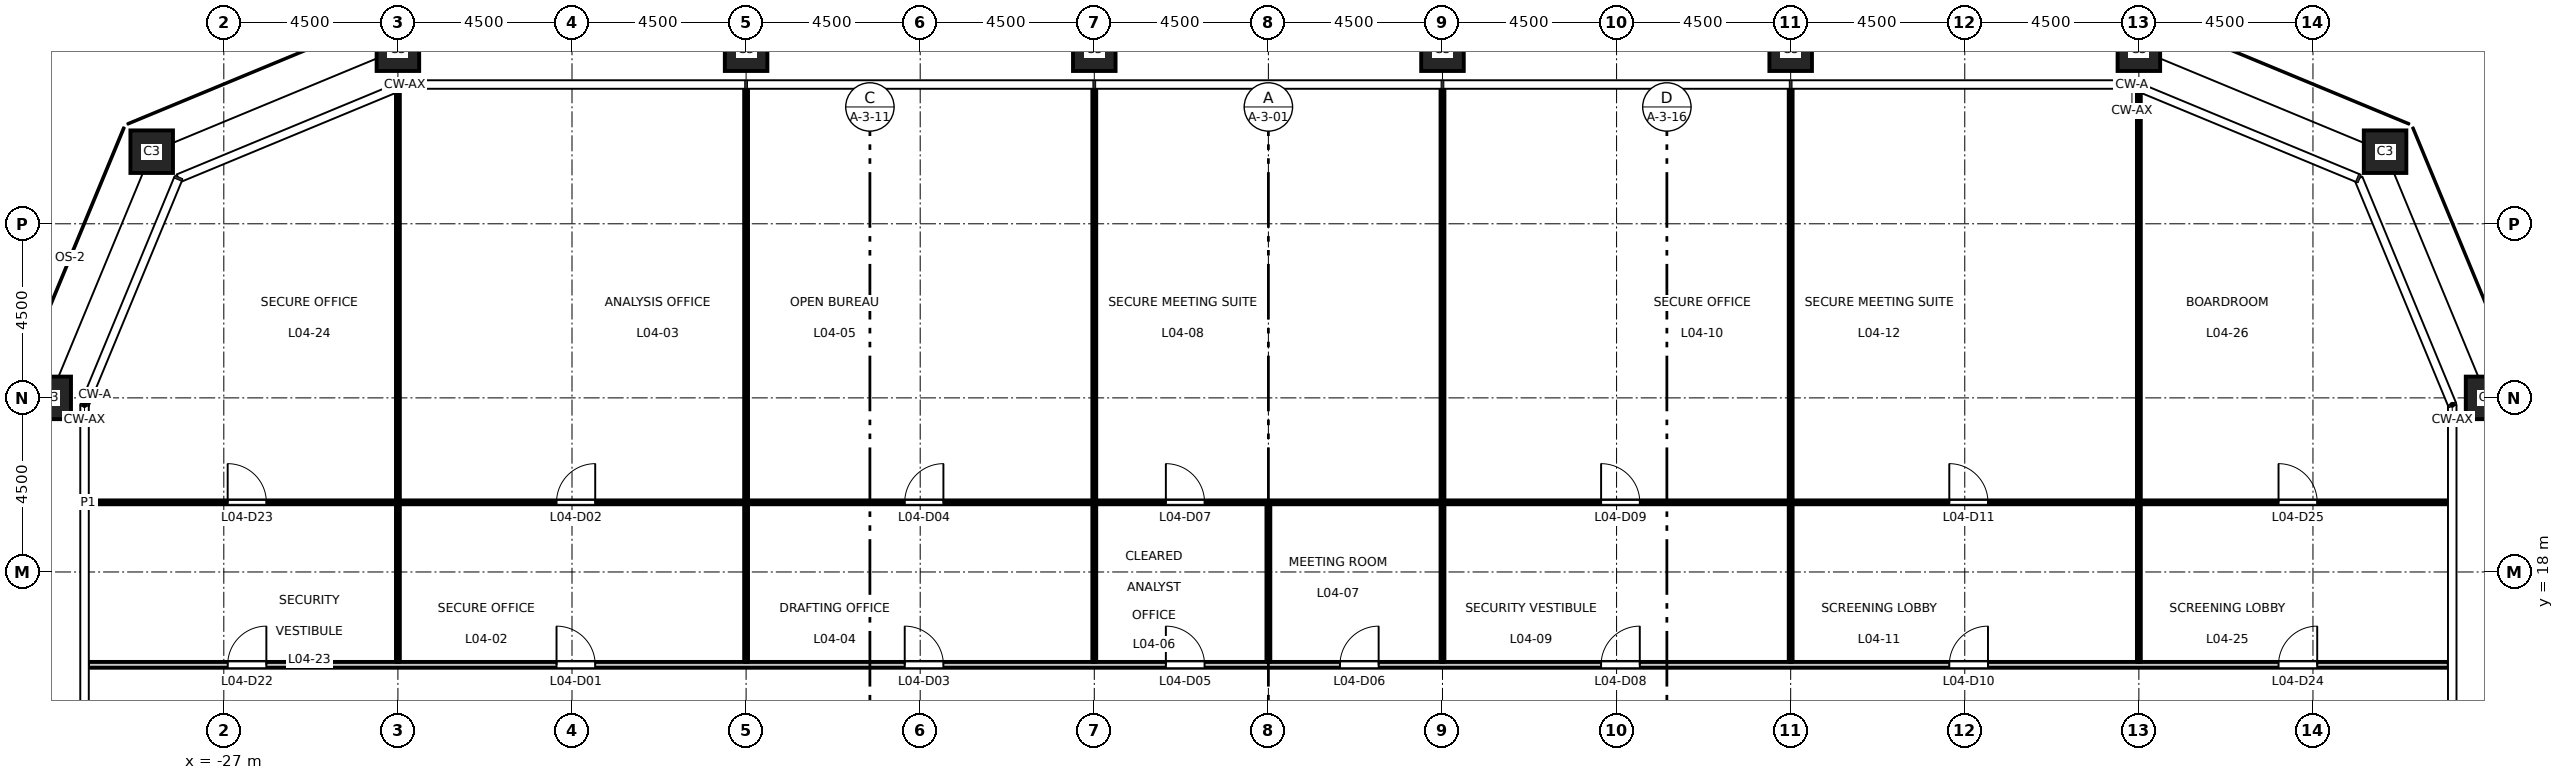
"""IFC4 building model, lengths in metres.
Left out: names, types, materials, properties, quantities, classifications, styles, units other than length and angle.
Written with IfcOpenShell. Run it as: python <this file> out.ifc"""

import sys

from ifc_helpers import new_model, si_unit, direction, frame, frame_2d, origin, origin_2d, place, context, subcontext, project, spatial, rectangle, hollow_rectangle, extrude, element, fill, save


model = new_model("IFC4")
c1 = context("Model", 3, precision=1e-05, world=origin(), true_north=direction((0.0, 1.0)))
c2 = subcontext(c1, "Body", "Model", "MODEL_VIEW")
j1 = project(units=[si_unit("LENGTHUNIT", "METRE"), si_unit("PLANEANGLEUNIT", "RADIAN")], contexts=[c1])
p1 = place(None, origin())
s1 = spatial("IfcSite", under=j1, at=p1, CompositionType="ELEMENT")
p2 = place(p1, origin())
s2 = spatial("IfcBuilding", under=s1, at=p2, CompositionType="ELEMENT")
p3 = place(p2, frame((0.0, 0.0, 22.2)))
s3 = spatial("IfcBuildingStorey", under=s2, at=p3, CompositionType="ELEMENT", Elevation=22.2)
for number, where, z_axis, x_axis in (
    (1, (31.5, 22.5, 0.0), (0.0, 0.0, 1.0), (1.0, 0.0, 0.0)),
    (2, (28.864, 28.864, 0.0), (0.0, 0.0, 1.0), (1.0, 0.0, 0.0)),
    (3, (22.5, 31.5, 0.0), (0.0, 0.0, 1.0), (1.0, 0.0, 0.0)),
    (4, (13.5, 31.5, 0.0), (0.0, 0.0, 1.0), (1.0, 0.0, 0.0)),
    (5, (4.5, 31.5, 0.0), (0.0, 0.0, 1.0), (1.0, 0.0, 0.0)),
    (6, (-4.5, 31.5, 0.0), (0.0, 0.0, 1.0), (1.0, 0.0, 0.0)),
    (7, (-13.5, 31.5, 0.0), (0.0, 0.0, 1.0), (1.0, 0.0, 0.0)),
    (8, (-22.5, 31.5, 0.0), (0.0, 0.0, 1.0), (1.0, 0.0, 0.0)),
    (9, (-28.864, 28.864, 0.0), (0.0, 0.0, 1.0), (1.0, 0.0, 0.0)),
    (10, (-31.5, 22.5, 0.0), (0.0, 0.0, 1.0), (1.0, 0.0, 0.0)),
):
    element("IfcColumn", number, at=place(p3, frame(where, z_axis=z_axis, x_axis=x_axis)), inside=s3, PredefinedType="COLUMN", context=c2, shape_type="SweptSolid", body=[
        extrude(hollow_rectangle(XDim=1.1, YDim=1.1, WallThickness=0.07, at=origin_2d()), origin(), (0.0, 0.0, 1.0), 4.5),
    ])
p4 = place(p3, frame((-30.51, 15.6, 0.0), z_axis=(0.0, 0.0, 1.0), x_axis=(1.0, 0.0, 0.0)))
e11 = element("IfcWall", 11, at=p4, inside=s3, PredefinedType="PARTITIONING", context=c2, shape_type="SweptSolid", body=[
    extrude(rectangle(XDim=61.02, YDim=0.15, at=frame_2d((30.51, 0.0))), origin(), (0.0, 0.0, 1.0), 4.35),
])
p5 = place(p4, frame((12.11, 0.0, 0.0)))
e12 = element("IfcOpeningElement", 12, at=p5, cuts=e11, PredefinedType="OPENING", context=c2, shape_type="SweptSolid", body=[
    extrude(rectangle(XDim=1.0, YDim=2.1, at=frame_2d((0.5, 1.05))), frame((0.0, 0.085, 0.0), z_axis=(0.0, -1.0, 0.0), x_axis=(1.0, 0.0, 0.0)), (0.0, 0.0, 1.0), 0.17),
])
p6 = place(p4, frame((21.11, 0.0, 0.0)))
e13 = element("IfcOpeningElement", 13, at=p6, cuts=e11, PredefinedType="OPENING", context=c2, shape_type="SweptSolid", body=[
    extrude(rectangle(XDim=1.0, YDim=2.1, at=frame_2d((0.5, 1.05))), frame((0.0, 0.085, 0.0), z_axis=(0.0, -1.0, 0.0), x_axis=(1.0, 0.0, 0.0)), (0.0, 0.0, 1.0), 0.17),
])
p7 = place(p4, frame((27.86, 0.0, 0.0)))
e14 = element("IfcOpeningElement", 14, at=p7, cuts=e11, PredefinedType="OPENING", context=c2, shape_type="SweptSolid", body=[
    extrude(rectangle(XDim=1.0, YDim=2.1, at=frame_2d((0.5, 1.05))), frame((0.0, 0.085, 0.0), z_axis=(0.0, -1.0, 0.0), x_axis=(1.0, 0.0, 0.0)), (0.0, 0.0, 1.0), 0.17),
])
p8 = place(p4, frame((32.36, 0.0, 0.0)))
e15 = element("IfcOpeningElement", 15, at=p8, cuts=e11, PredefinedType="OPENING", context=c2, shape_type="SweptSolid", body=[
    extrude(rectangle(XDim=1.0, YDim=2.1, at=frame_2d((0.5, 1.05))), frame((0.0, 0.085, 0.0), z_axis=(0.0, -1.0, 0.0), x_axis=(1.0, 0.0, 0.0)), (0.0, 0.0, 1.0), 0.17),
])
p9 = place(p4, frame((39.11, 0.0, 0.0)))
e16 = element("IfcOpeningElement", 16, at=p9, cuts=e11, PredefinedType="OPENING", context=c2, shape_type="SweptSolid", body=[
    extrude(rectangle(XDim=1.0, YDim=2.1, at=frame_2d((0.5, 1.05))), frame((0.0, 0.085, 0.0), z_axis=(0.0, -1.0, 0.0), x_axis=(1.0, 0.0, 0.0)), (0.0, 0.0, 1.0), 0.17),
])
p10 = place(p4, frame((48.11, 0.0, 0.0)))
e17 = element("IfcOpeningElement", 17, at=p10, cuts=e11, PredefinedType="OPENING", context=c2, shape_type="SweptSolid", body=[
    extrude(rectangle(XDim=1.0, YDim=2.1, at=frame_2d((0.5, 1.05))), frame((0.0, 0.085, 0.0), z_axis=(0.0, -1.0, 0.0), x_axis=(1.0, 0.0, 0.0)), (0.0, 0.0, 1.0), 0.17),
])
p11 = place(p4, frame((3.61, 0.0, 0.0)))
e18 = element("IfcOpeningElement", 18, at=p11, cuts=e11, PredefinedType="OPENING", context=c2, shape_type="SweptSolid", body=[
    extrude(rectangle(XDim=1.0, YDim=2.1, at=frame_2d((0.5, 1.05))), frame((0.0, 0.085, 0.0), z_axis=(0.0, -1.0, 0.0), x_axis=(1.0, 0.0, 0.0)), (0.0, 0.0, 1.0), 0.17),
])
p12 = place(p4, frame((56.62, 0.0, 0.0)))
e19 = element("IfcOpeningElement", 19, at=p12, cuts=e11, PredefinedType="OPENING", context=c2, shape_type="SweptSolid", body=[
    extrude(rectangle(XDim=1.0, YDim=2.1, at=frame_2d((0.5, 1.05))), frame((0.0, 0.085, 0.0), z_axis=(0.0, -1.0, 0.0), x_axis=(1.0, 0.0, 0.0)), (0.0, 0.0, 1.0), 0.17),
])
p13 = place(p3, frame((-30.51, 19.8, 0.0), z_axis=(0.0, 0.0, 1.0), x_axis=(1.0, 0.0, 0.0)))
e20 = element("IfcWall", 20, at=p13, inside=s3, PredefinedType="PARTITIONING", context=c2, shape_type="SweptSolid", body=[
    extrude(rectangle(XDim=61.02, YDim=0.1, at=frame_2d((30.51, 0.0))), origin(), (0.0, 0.0, 1.0), 4.35),
])
p14 = place(p13, frame((12.11, 0.0, 0.0)))
e21 = element("IfcOpeningElement", 21, at=p14, cuts=e20, PredefinedType="OPENING", context=c2, shape_type="SweptSolid", body=[
    extrude(rectangle(XDim=1.0, YDim=2.1, at=frame_2d((0.5, 1.05))), frame((0.0, 0.06, 0.0), z_axis=(0.0, -1.0, 0.0), x_axis=(1.0, 0.0, 0.0)), (0.0, 0.0, 1.0), 0.12),
])
p15 = place(p13, frame((21.11, 0.0, 0.0)))
e22 = element("IfcOpeningElement", 22, at=p15, cuts=e20, PredefinedType="OPENING", context=c2, shape_type="SweptSolid", body=[
    extrude(rectangle(XDim=1.0, YDim=2.1, at=frame_2d((0.5, 1.05))), frame((0.0, 0.06, 0.0), z_axis=(0.0, -1.0, 0.0), x_axis=(1.0, 0.0, 0.0)), (0.0, 0.0, 1.0), 0.12),
])
p16 = place(p13, frame((27.86, 0.0, 0.0)))
e23 = element("IfcOpeningElement", 23, at=p16, cuts=e20, PredefinedType="OPENING", context=c2, shape_type="SweptSolid", body=[
    extrude(rectangle(XDim=1.0, YDim=2.1, at=frame_2d((0.5, 1.05))), frame((0.0, 0.06, 0.0), z_axis=(0.0, -1.0, 0.0), x_axis=(1.0, 0.0, 0.0)), (0.0, 0.0, 1.0), 0.12),
])
p17 = place(p13, frame((39.11, 0.0, 0.0)))
e24 = element("IfcOpeningElement", 24, at=p17, cuts=e20, PredefinedType="OPENING", context=c2, shape_type="SweptSolid", body=[
    extrude(rectangle(XDim=1.0, YDim=2.1, at=frame_2d((0.5, 1.05))), frame((0.0, 0.06, 0.0), z_axis=(0.0, -1.0, 0.0), x_axis=(1.0, 0.0, 0.0)), (0.0, 0.0, 1.0), 0.12),
])
p18 = place(p13, frame((48.11, 0.0, 0.0)))
e25 = element("IfcOpeningElement", 25, at=p18, cuts=e20, PredefinedType="OPENING", context=c2, shape_type="SweptSolid", body=[
    extrude(rectangle(XDim=1.0, YDim=2.1, at=frame_2d((0.5, 1.05))), frame((0.0, 0.06, 0.0), z_axis=(0.0, -1.0, 0.0), x_axis=(1.0, 0.0, 0.0)), (0.0, 0.0, 1.0), 0.12),
])
p19 = place(p13, frame((3.61, 0.0, 0.0)))
e26 = element("IfcOpeningElement", 26, at=p19, cuts=e20, PredefinedType="OPENING", context=c2, shape_type="SweptSolid", body=[
    extrude(rectangle(XDim=1.0, YDim=2.1, at=frame_2d((0.5, 1.05))), frame((0.0, 0.06, 0.0), z_axis=(0.0, -1.0, 0.0), x_axis=(1.0, 0.0, 0.0)), (0.0, 0.0, 1.0), 0.12),
])
p20 = place(p13, frame((56.62, 0.0, 0.0)))
e27 = element("IfcOpeningElement", 27, at=p20, cuts=e20, PredefinedType="OPENING", context=c2, shape_type="SweptSolid", body=[
    extrude(rectangle(XDim=1.0, YDim=2.1, at=frame_2d((0.5, 1.05))), frame((0.0, 0.06, 0.0), z_axis=(0.0, -1.0, 0.0), x_axis=(1.0, 0.0, 0.0)), (0.0, 0.0, 1.0), 0.12),
])
p21 = place(p3, frame((-22.5, 15.675, 0.0), z_axis=(0.0, 0.0, 1.0), x_axis=(0.0, 1.0, 0.0)))
e28 = element("IfcWall", 28, at=p21, inside=s3, PredefinedType="PARTITIONING", context=c2, shape_type="SweptSolid", body=[
    extrude(rectangle(XDim=4.075, YDim=0.1, at=frame_2d((2.038, 0.0))), origin(), (0.0, 0.0, 1.0), 3.35),
])
p22 = place(p3, frame((-22.5, 19.85, 0.0), z_axis=(0.0, 0.0, 1.0), x_axis=(0.0, 1.0, 0.0)))
e29 = element("IfcWall", 29, at=p22, inside=s3, PredefinedType="PARTITIONING", context=c2, shape_type="SweptSolid", body=[
    extrude(rectangle(XDim=10.578, YDim=0.1, at=frame_2d((5.289, 0.0))), origin(), (0.0, 0.0, 1.0), 3.35),
])
p23 = place(p3, frame((-13.5, 15.675, 0.0), z_axis=(0.0, 0.0, 1.0), x_axis=(0.0, 1.0, 0.0)))
e30 = element("IfcWall", 30, at=p23, inside=s3, PredefinedType="PARTITIONING", context=c2, shape_type="SweptSolid", body=[
    extrude(rectangle(XDim=4.075, YDim=0.1, at=frame_2d((2.038, 0.0))), origin(), (0.0, 0.0, 1.0), 3.35),
])
p24 = place(p3, frame((-13.5, 19.85, 0.0), z_axis=(0.0, 0.0, 1.0), x_axis=(0.0, 1.0, 0.0)))
e31 = element("IfcWall", 31, at=p24, inside=s3, PredefinedType="PARTITIONING", context=c2, shape_type="SweptSolid", body=[
    extrude(rectangle(XDim=10.66, YDim=0.1, at=frame_2d((5.33, 0.0))), origin(), (0.0, 0.0, 1.0), 3.35),
])
p25 = place(p3, frame((-4.5, 15.675, 0.0), z_axis=(0.0, 0.0, 1.0), x_axis=(0.0, 1.0, 0.0)))
e32 = element("IfcWall", 32, at=p25, inside=s3, PredefinedType="PARTITIONING", context=c2, shape_type="SweptSolid", body=[
    extrude(rectangle(XDim=4.075, YDim=0.1, at=frame_2d((2.038, 0.0))), origin(), (0.0, 0.0, 1.0), 3.35),
])
p26 = place(p3, frame((-4.5, 19.85, 0.0), z_axis=(0.0, 0.0, 1.0), x_axis=(0.0, 1.0, 0.0)))
e33 = element("IfcWall", 33, at=p26, inside=s3, PredefinedType="PARTITIONING", context=c2, shape_type="SweptSolid", body=[
    extrude(rectangle(XDim=10.66, YDim=0.1, at=frame_2d((5.33, 0.0))), origin(), (0.0, 0.0, 1.0), 3.35),
])
p27 = place(p3, frame((0.0, 15.675, 0.0), z_axis=(0.0, 0.0, 1.0), x_axis=(0.0, 1.0, 0.0)))
e34 = element("IfcWall", 34, at=p27, inside=s3, PredefinedType="PARTITIONING", context=c2, shape_type="SweptSolid", body=[
    extrude(rectangle(XDim=4.075, YDim=0.1, at=frame_2d((2.038, 0.0))), origin(), (0.0, 0.0, 1.0), 4.35),
])
p28 = place(p3, frame((4.5, 15.675, 0.0), z_axis=(0.0, 0.0, 1.0), x_axis=(0.0, 1.0, 0.0)))
e35 = element("IfcWall", 35, at=p28, inside=s3, PredefinedType="PARTITIONING", context=c2, shape_type="SweptSolid", body=[
    extrude(rectangle(XDim=4.075, YDim=0.1, at=frame_2d((2.038, 0.0))), origin(), (0.0, 0.0, 1.0), 3.35),
])
p29 = place(p3, frame((4.5, 19.85, 0.0), z_axis=(0.0, 0.0, 1.0), x_axis=(0.0, 1.0, 0.0)))
e36 = element("IfcWall", 36, at=p29, inside=s3, PredefinedType="PARTITIONING", context=c2, shape_type="SweptSolid", body=[
    extrude(rectangle(XDim=10.66, YDim=0.1, at=frame_2d((5.33, 0.0))), origin(), (0.0, 0.0, 1.0), 3.35),
])
p30 = place(p3, frame((13.5, 15.675, 0.0), z_axis=(0.0, 0.0, 1.0), x_axis=(0.0, 1.0, 0.0)))
e37 = element("IfcWall", 37, at=p30, inside=s3, PredefinedType="PARTITIONING", context=c2, shape_type="SweptSolid", body=[
    extrude(rectangle(XDim=4.075, YDim=0.1, at=frame_2d((2.038, 0.0))), origin(), (0.0, 0.0, 1.0), 3.35),
])
p31 = place(p3, frame((13.5, 19.85, 0.0), z_axis=(0.0, 0.0, 1.0), x_axis=(0.0, 1.0, 0.0)))
e38 = element("IfcWall", 38, at=p31, inside=s3, PredefinedType="PARTITIONING", context=c2, shape_type="SweptSolid", body=[
    extrude(rectangle(XDim=10.66, YDim=0.1, at=frame_2d((5.33, 0.0))), origin(), (0.0, 0.0, 1.0), 3.35),
])
p32 = place(p3, frame((22.5, 15.675, 0.0), z_axis=(0.0, 0.0, 1.0), x_axis=(0.0, 1.0, 0.0)))
e39 = element("IfcWall", 39, at=p32, inside=s3, PredefinedType="PARTITIONING", context=c2, shape_type="SweptSolid", body=[
    extrude(rectangle(XDim=4.075, YDim=0.1, at=frame_2d((2.038, 0.0))), origin(), (0.0, 0.0, 1.0), 3.35),
])
p33 = place(p3, frame((22.5, 19.85, 0.0), z_axis=(0.0, 0.0, 1.0), x_axis=(0.0, 1.0, 0.0)))
e40 = element("IfcWall", 40, at=p33, inside=s3, PredefinedType="PARTITIONING", context=c2, shape_type="SweptSolid", body=[
    extrude(rectangle(XDim=10.578, YDim=0.1, at=frame_2d((5.289, 0.0))), origin(), (0.0, 0.0, 1.0), 3.35),
])
p34 = place(p5, origin())
e41 = element("IfcDoor", 41, at=p34, inside=s3, OperationType="SINGLE_SWING_LEFT", PredefinedType="DOOR", context=c2, shape_type="SweptSolid", body=[
    extrude(rectangle(XDim=1.0, YDim=2.1, at=frame_2d((0.5, 1.05))), frame((0.0, 0.025, 0.0), z_axis=(0.0, -1.0, 0.0), x_axis=(1.0, 0.0, 0.0)), (0.0, 0.0, 1.0), 0.05),
])
fill(e12, e41)
p35 = place(p14, origin())
e42 = element("IfcDoor", 42, at=p35, inside=s3, OperationType="SINGLE_SWING_RIGHT", PredefinedType="DOOR", context=c2, shape_type="SweptSolid", body=[
    extrude(rectangle(XDim=1.0, YDim=2.1, at=frame_2d((0.5, 1.05))), frame((0.0, 0.025, 0.0), z_axis=(0.0, -1.0, 0.0), x_axis=(1.0, 0.0, 0.0)), (0.0, 0.0, 1.0), 0.05),
])
fill(e21, e42)
p36 = place(p6, origin())
e43 = element("IfcDoor", 43, at=p36, inside=s3, OperationType="SINGLE_SWING_LEFT", PredefinedType="DOOR", context=c2, shape_type="SweptSolid", body=[
    extrude(rectangle(XDim=1.0, YDim=2.1, at=frame_2d((0.5, 1.05))), frame((0.0, 0.025, 0.0), z_axis=(0.0, -1.0, 0.0), x_axis=(1.0, 0.0, 0.0)), (0.0, 0.0, 1.0), 0.05),
])
fill(e13, e43)
p37 = place(p15, origin())
e44 = element("IfcDoor", 44, at=p37, inside=s3, OperationType="SINGLE_SWING_RIGHT", PredefinedType="DOOR", context=c2, shape_type="SweptSolid", body=[
    extrude(rectangle(XDim=1.0, YDim=2.1, at=frame_2d((0.5, 1.05))), frame((0.0, 0.025, 0.0), z_axis=(0.0, -1.0, 0.0), x_axis=(1.0, 0.0, 0.0)), (0.0, 0.0, 1.0), 0.05),
])
fill(e22, e44)
p38 = place(p7, origin())
e45 = element("IfcDoor", 45, at=p38, inside=s3, OperationType="SINGLE_SWING_LEFT", PredefinedType="DOOR", context=c2, shape_type="SweptSolid", body=[
    extrude(rectangle(XDim=1.0, YDim=2.1, at=frame_2d((0.5, 1.05))), frame((0.0, 0.025, 0.0), z_axis=(0.0, -1.0, 0.0), x_axis=(1.0, 0.0, 0.0)), (0.0, 0.0, 1.0), 0.05),
])
fill(e14, e45)
p39 = place(p8, origin())
e46 = element("IfcDoor", 46, at=p39, inside=s3, OperationType="SINGLE_SWING_RIGHT", PredefinedType="DOOR", context=c2, shape_type="SweptSolid", body=[
    extrude(rectangle(XDim=1.0, YDim=2.1, at=frame_2d((0.5, 1.05))), frame((0.0, 0.025, 0.0), z_axis=(0.0, -1.0, 0.0), x_axis=(1.0, 0.0, 0.0)), (0.0, 0.0, 1.0), 0.05),
])
fill(e15, e46)
p40 = place(p16, origin())
e47 = element("IfcDoor", 47, at=p40, inside=s3, OperationType="SINGLE_SWING_LEFT", PredefinedType="DOOR", context=c2, shape_type="SweptSolid", body=[
    extrude(rectangle(XDim=1.0, YDim=2.1, at=frame_2d((0.5, 1.05))), frame((0.0, 0.025, 0.0), z_axis=(0.0, -1.0, 0.0), x_axis=(1.0, 0.0, 0.0)), (0.0, 0.0, 1.0), 0.05),
])
fill(e23, e47)
p41 = place(p9, origin())
e48 = element("IfcDoor", 48, at=p41, inside=s3, OperationType="SINGLE_SWING_RIGHT", PredefinedType="DOOR", context=c2, shape_type="SweptSolid", body=[
    extrude(rectangle(XDim=1.0, YDim=2.1, at=frame_2d((0.5, 1.05))), frame((0.0, 0.025, 0.0), z_axis=(0.0, -1.0, 0.0), x_axis=(1.0, 0.0, 0.0)), (0.0, 0.0, 1.0), 0.05),
])
fill(e16, e48)
p42 = place(p17, origin())
e49 = element("IfcDoor", 49, at=p42, inside=s3, OperationType="SINGLE_SWING_LEFT", PredefinedType="DOOR", context=c2, shape_type="SweptSolid", body=[
    extrude(rectangle(XDim=1.0, YDim=2.1, at=frame_2d((0.5, 1.05))), frame((0.0, 0.025, 0.0), z_axis=(0.0, -1.0, 0.0), x_axis=(1.0, 0.0, 0.0)), (0.0, 0.0, 1.0), 0.05),
])
fill(e24, e49)
p43 = place(p10, origin())
e50 = element("IfcDoor", 50, at=p43, inside=s3, OperationType="SINGLE_SWING_RIGHT", PredefinedType="DOOR", context=c2, shape_type="SweptSolid", body=[
    extrude(rectangle(XDim=1.0, YDim=2.1, at=frame_2d((0.5, 1.05))), frame((0.0, 0.025, 0.0), z_axis=(0.0, -1.0, 0.0), x_axis=(1.0, 0.0, 0.0)), (0.0, 0.0, 1.0), 0.05),
])
fill(e17, e50)
p44 = place(p18, origin())
e51 = element("IfcDoor", 51, at=p44, inside=s3, OperationType="SINGLE_SWING_LEFT", PredefinedType="DOOR", context=c2, shape_type="SweptSolid", body=[
    extrude(rectangle(XDim=1.0, YDim=2.1, at=frame_2d((0.5, 1.05))), frame((0.0, 0.025, 0.0), z_axis=(0.0, -1.0, 0.0), x_axis=(1.0, 0.0, 0.0)), (0.0, 0.0, 1.0), 0.05),
])
fill(e25, e51)
p45 = place(p11, origin())
e52 = element("IfcDoor", 52, at=p45, inside=s3, OperationType="SINGLE_SWING_RIGHT", PredefinedType="DOOR", context=c2, shape_type="SweptSolid", body=[
    extrude(rectangle(XDim=1.0, YDim=2.1, at=frame_2d((0.5, 1.05))), frame((0.0, 0.025, 0.0), z_axis=(0.0, -1.0, 0.0), x_axis=(1.0, 0.0, 0.0)), (0.0, 0.0, 1.0), 0.05),
])
fill(e18, e52)
p46 = place(p19, origin())
e53 = element("IfcDoor", 53, at=p46, inside=s3, OperationType="SINGLE_SWING_LEFT", PredefinedType="DOOR", context=c2, shape_type="SweptSolid", body=[
    extrude(rectangle(XDim=1.0, YDim=2.1, at=frame_2d((0.5, 1.05))), frame((0.0, 0.025, 0.0), z_axis=(0.0, -1.0, 0.0), x_axis=(1.0, 0.0, 0.0)), (0.0, 0.0, 1.0), 0.05),
])
fill(e26, e53)
p47 = place(p12, origin())
e54 = element("IfcDoor", 54, at=p47, inside=s3, OperationType="SINGLE_SWING_RIGHT", PredefinedType="DOOR", context=c2, shape_type="SweptSolid", body=[
    extrude(rectangle(XDim=1.0, YDim=2.1, at=frame_2d((0.5, 1.05))), frame((0.0, 0.025, 0.0), z_axis=(0.0, -1.0, 0.0), x_axis=(1.0, 0.0, 0.0)), (0.0, 0.0, 1.0), 0.05),
])
fill(e19, e54)
p48 = place(p20, origin())
e55 = element("IfcDoor", 55, at=p48, inside=s3, OperationType="SINGLE_SWING_LEFT", PredefinedType="DOOR", context=c2, shape_type="SweptSolid", body=[
    extrude(rectangle(XDim=1.0, YDim=2.1, at=frame_2d((0.5, 1.05))), frame((0.0, 0.025, 0.0), z_axis=(0.0, -1.0, 0.0), x_axis=(1.0, 0.0, 0.0)), (0.0, 0.0, 1.0), 0.05),
])
fill(e27, e55)
save(model, sys.argv[1])
